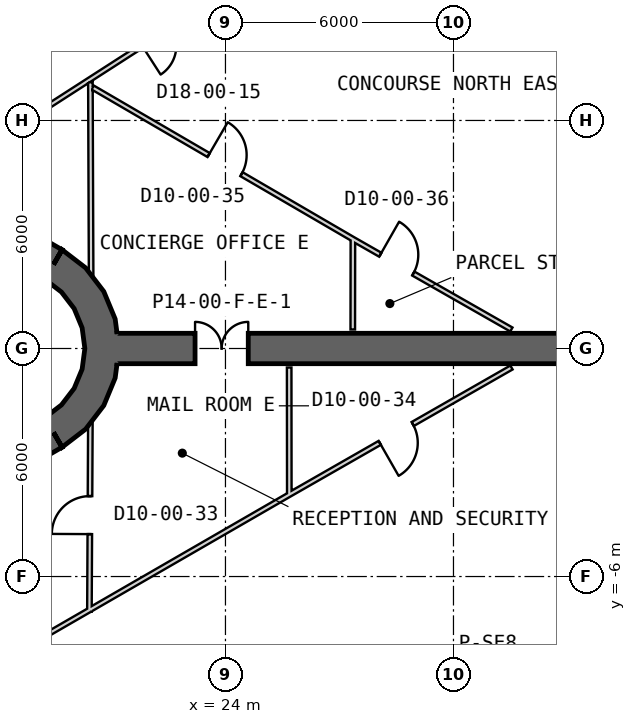
"""IFC4 building model, lengths in metres.
Left out: names, types, materials, properties, quantities, classifications, styles, units other than length and angle.
Written with IfcOpenShell. Run it as: python <this file> out.ifc"""

import sys

from ifc_helpers import new_model, si_unit, direction, frame, frame_2d, origin, place, context, subcontext, project, spatial, polyline, rectangle, outline, extrude, element, fill, save


model = new_model("IFC4")
c1 = context("Model", 3, precision=1e-05, world=origin(), true_north=direction((0.0, 1.0)))
c2 = subcontext(c1, "Body", "Model", "MODEL_VIEW")
j1 = project(units=[si_unit("LENGTHUNIT", "METRE"), si_unit("PLANEANGLEUNIT", "RADIAN")], contexts=[c1])
p1 = place(None, origin())
s1 = spatial("IfcSite", under=j1, at=p1, CompositionType="ELEMENT")
p2 = place(p1, origin())
s2 = spatial("IfcBuilding", under=s1, at=p2, CompositionType="ELEMENT")
p3 = place(p2, origin())
s3 = spatial("IfcBuildingStorey", under=s2, at=p3, CompositionType="ELEMENT", Elevation=0.0)
p4 = place(p3, frame((19.475, 2.208, 0.0), z_axis=(0.0, 0.0, 1.0), x_axis=(-0.866028369851, 0.499994862586, 0.0)))
e1 = element("IfcWall", 1, at=p4, inside=s3, PredefinedType="SHEAR", context=c2, shape_type="SweptSolid", body=[
    extrude(rectangle(XDim=31.523, YDim=0.9, at=frame_2d((15.762, 0.0))), origin(), (0.0, 0.0, 1.0), 9.0),
])
p5 = place(p4, frame((7.062, 0.0, 0.0)))
e2 = element("IfcOpeningElement", 2, at=p5, cuts=e1, PredefinedType="OPENING", context=c2, shape_type="SweptSolid", body=[
    extrude(rectangle(XDim=1.2, YDim=2.4, at=frame_2d((0.6, 1.2))), frame((0.0, 0.46, 0.0), z_axis=(0.0, -1.0, 0.0), x_axis=(1.0, 0.0, 0.0)), (0.0, 0.0, 1.0), 0.92),
])
p6 = place(p4, frame((9.762, 0.0, 0.0)))
e3 = element("IfcOpeningElement", 3, at=p6, cuts=e1, PredefinedType="OPENING", context=c2, shape_type="SweptSolid", body=[
    extrude(rectangle(XDim=1.2, YDim=2.4, at=frame_2d((0.6, 1.2))), frame((0.0, 0.46, 0.0), z_axis=(0.0, -1.0, 0.0), x_axis=(1.0, 0.0, 0.0)), (0.0, 0.0, 1.0), 0.92),
])
p7 = place(p4, frame((12.462, 0.0, 0.0)))
e4 = element("IfcOpeningElement", 4, at=p7, cuts=e1, PredefinedType="OPENING", context=c2, shape_type="SweptSolid", body=[
    extrude(rectangle(XDim=1.2, YDim=2.4, at=frame_2d((0.6, 1.2))), frame((0.0, 0.46, 0.0), z_axis=(0.0, -1.0, 0.0), x_axis=(1.0, 0.0, 0.0)), (0.0, 0.0, 1.0), 0.92),
])
p8 = place(p4, frame((15.162, 0.0, 0.0)))
e5 = element("IfcOpeningElement", 5, at=p8, cuts=e1, PredefinedType="OPENING", context=c2, shape_type="SweptSolid", body=[
    extrude(rectangle(XDim=1.2, YDim=2.4, at=frame_2d((0.6, 1.2))), frame((0.0, 0.46, 0.0), z_axis=(0.0, -1.0, 0.0), x_axis=(1.0, 0.0, 0.0)), (0.0, 0.0, 1.0), 0.92),
])
p9 = place(p4, frame((17.862, 0.0, 0.0)))
e6 = element("IfcOpeningElement", 6, at=p9, cuts=e1, PredefinedType="OPENING", context=c2, shape_type="SweptSolid", body=[
    extrude(rectangle(XDim=1.2, YDim=2.4, at=frame_2d((0.6, 1.2))), frame((0.0, 0.46, 0.0), z_axis=(0.0, -1.0, 0.0), x_axis=(1.0, 0.0, 0.0)), (0.0, 0.0, 1.0), 0.92),
])
p10 = place(p4, frame((20.562, 0.0, 0.0)))
e7 = element("IfcOpeningElement", 7, at=p10, cuts=e1, PredefinedType="OPENING", context=c2, shape_type="SweptSolid", body=[
    extrude(rectangle(XDim=1.2, YDim=2.4, at=frame_2d((0.6, 1.2))), frame((0.0, 0.46, 0.0), z_axis=(0.0, -1.0, 0.0), x_axis=(1.0, 0.0, 0.0)), (0.0, 0.0, 1.0), 0.92),
])
p11 = place(p4, frame((23.262, 0.0, 0.0)))
e8 = element("IfcOpeningElement", 8, at=p11, cuts=e1, PredefinedType="OPENING", context=c2, shape_type="SweptSolid", body=[
    extrude(rectangle(XDim=1.2, YDim=2.4, at=frame_2d((0.6, 1.2))), frame((0.0, 0.46, 0.0), z_axis=(0.0, -1.0, 0.0), x_axis=(1.0, 0.0, 0.0)), (0.0, 0.0, 1.0), 0.92),
])
p12 = place(p4, frame((3.612, 0.0, 0.0)))
e9 = element("IfcOpeningElement", 9, at=p12, cuts=e1, PredefinedType="OPENING", context=c2, shape_type="SweptSolid", body=[
    extrude(rectangle(XDim=1.2, YDim=2.4, at=frame_2d((0.6, 1.2))), frame((0.0, 0.46, 0.0), z_axis=(0.0, -1.0, 0.0), x_axis=(1.0, 0.0, 0.0)), (0.0, 0.0, 1.0), 0.92),
])
p13 = place(p4, frame((26.712, 0.0, 0.0)))
e10 = element("IfcOpeningElement", 10, at=p13, cuts=e1, PredefinedType="OPENING", context=c2, shape_type="SweptSolid", body=[
    extrude(rectangle(XDim=1.2, YDim=2.4, at=frame_2d((0.6, 1.2))), frame((0.0, 0.46, 0.0), z_axis=(0.0, -1.0, 0.0), x_axis=(1.0, 0.0, 0.0)), (0.0, 0.0, 1.0), 0.92),
])
p14 = place(p3, frame((-7.825, -17.97, 0.0), z_axis=(0.0, 0.0, 1.0), x_axis=(0.866028369851, 0.499994862586, 0.0)))
e11 = element("IfcWall", 11, at=p14, inside=s3, PredefinedType="SHEAR", context=c2, shape_type="SweptSolid", body=[
    extrude(rectangle(XDim=31.523, YDim=0.9, at=frame_2d((15.762, 0.0))), origin(), (0.0, 0.0, 1.0), 9.0),
])
p15 = place(p14, frame((7.062, 0.0, 0.0)))
e12 = element("IfcOpeningElement", 12, at=p15, cuts=e11, PredefinedType="OPENING", context=c2, shape_type="SweptSolid", body=[
    extrude(rectangle(XDim=1.2, YDim=2.4, at=frame_2d((0.6, 1.2))), frame((0.0, 0.46, 0.0), z_axis=(0.0, -1.0, 0.0), x_axis=(1.0, 0.0, 0.0)), (0.0, 0.0, 1.0), 0.92),
])
p16 = place(p14, frame((9.762, 0.0, 0.0)))
e13 = element("IfcOpeningElement", 13, at=p16, cuts=e11, PredefinedType="OPENING", context=c2, shape_type="SweptSolid", body=[
    extrude(rectangle(XDim=1.2, YDim=2.4, at=frame_2d((0.6, 1.2))), frame((0.0, 0.46, 0.0), z_axis=(0.0, -1.0, 0.0), x_axis=(1.0, 0.0, 0.0)), (0.0, 0.0, 1.0), 0.92),
])
p17 = place(p14, frame((12.462, 0.0, 0.0)))
e14 = element("IfcOpeningElement", 14, at=p17, cuts=e11, PredefinedType="OPENING", context=c2, shape_type="SweptSolid", body=[
    extrude(rectangle(XDim=1.2, YDim=2.4, at=frame_2d((0.6, 1.2))), frame((0.0, 0.46, 0.0), z_axis=(0.0, -1.0, 0.0), x_axis=(1.0, 0.0, 0.0)), (0.0, 0.0, 1.0), 0.92),
])
p18 = place(p14, frame((15.162, 0.0, 0.0)))
e15 = element("IfcOpeningElement", 15, at=p18, cuts=e11, PredefinedType="OPENING", context=c2, shape_type="SweptSolid", body=[
    extrude(rectangle(XDim=1.2, YDim=2.4, at=frame_2d((0.6, 1.2))), frame((0.0, 0.46, 0.0), z_axis=(0.0, -1.0, 0.0), x_axis=(1.0, 0.0, 0.0)), (0.0, 0.0, 1.0), 0.92),
])
p19 = place(p14, frame((17.862, 0.0, 0.0)))
e16 = element("IfcOpeningElement", 16, at=p19, cuts=e11, PredefinedType="OPENING", context=c2, shape_type="SweptSolid", body=[
    extrude(rectangle(XDim=1.2, YDim=2.4, at=frame_2d((0.6, 1.2))), frame((0.0, 0.46, 0.0), z_axis=(0.0, -1.0, 0.0), x_axis=(1.0, 0.0, 0.0)), (0.0, 0.0, 1.0), 0.92),
])
p20 = place(p14, frame((20.562, 0.0, 0.0)))
e17 = element("IfcOpeningElement", 17, at=p20, cuts=e11, PredefinedType="OPENING", context=c2, shape_type="SweptSolid", body=[
    extrude(rectangle(XDim=1.2, YDim=2.4, at=frame_2d((0.6, 1.2))), frame((0.0, 0.46, 0.0), z_axis=(0.0, -1.0, 0.0), x_axis=(1.0, 0.0, 0.0)), (0.0, 0.0, 1.0), 0.92),
])
p21 = place(p14, frame((26.712, 0.0, 0.0)))
e18 = element("IfcOpeningElement", 18, at=p21, cuts=e11, PredefinedType="OPENING", context=c2, shape_type="SweptSolid", body=[
    extrude(rectangle(XDim=1.2, YDim=2.4, at=frame_2d((0.6, 1.2))), frame((0.0, 0.46, 0.0), z_axis=(0.0, -1.0, 0.0), x_axis=(1.0, 0.0, 0.0)), (0.0, 0.0, 1.0), 0.92),
])
p22 = place(p14, frame((3.612, 0.0, 0.0)))
e19 = element("IfcOpeningElement", 19, at=p22, cuts=e11, PredefinedType="OPENING", context=c2, shape_type="SweptSolid", body=[
    extrude(rectangle(XDim=1.2, YDim=2.4, at=frame_2d((0.6, 1.2))), frame((0.0, 0.46, 0.0), z_axis=(0.0, -1.0, 0.0), x_axis=(1.0, 0.0, 0.0)), (0.0, 0.0, 1.0), 0.92),
])
p23 = place(p3, origin())
e20 = element("IfcWall", 20, at=p23, inside=s3, PredefinedType="SHEAR", context=c2, shape_type="SweptSolid", body=[
    extrude(outline(polyline([(19.7, -2.598), (20.321, -2.121), (20.798, -1.5), (21.098, -0.777), (21.2, 0.0), (21.098, 0.777), (20.798, 1.5), (20.321, 2.121), (19.7, 2.598), (19.25, 1.819), (19.685, 1.485), (20.019, 1.05), (20.229, 0.543), (20.3, 0.0), (20.229, -0.543), (20.019, -1.05), (19.685, -1.485), (19.25, -1.819), (19.7, -2.598)])), origin(), (0.0, 0.0, 1.0), 9.0),
])
p24 = place(p3, frame((21.15, 0.0, 0.0), z_axis=(0.0, 0.0, 1.0), x_axis=(1.0, 0.0, 0.0)))
e21 = element("IfcWall", 21, at=p24, inside=s3, PredefinedType="SHEAR", context=c2, shape_type="SweptSolid", body=[
    extrude(rectangle(XDim=13.954, YDim=0.8, at=frame_2d((6.977, 0.0))), origin(), (0.0, 0.0, 1.0), 9.0),
])
p25 = place(p24, frame((2.05, 0.0, 0.0)))
e22 = element("IfcOpeningElement", 22, at=p25, cuts=e21, PredefinedType="OPENING", context=c2, shape_type="SweptSolid", body=[
    extrude(rectangle(XDim=1.4, YDim=2.4, at=frame_2d((0.7, 1.2))), frame((0.0, 0.41, 0.0), z_axis=(0.0, -1.0, 0.0), x_axis=(1.0, 0.0, 0.0)), (0.0, 0.0, 1.0), 0.82),
])
p26 = place(p3, frame((20.42, -6.917, 0.0), z_axis=(0.0, 0.0, 1.0), x_axis=(0.005057124102, 0.999987212666, 0.0)))
e23 = element("IfcWall", 23, at=p26, inside=s3, PredefinedType="PARTITIONING", context=c2, shape_type="SweptSolid", body=[
    extrude(rectangle(XDim=5.166, YDim=0.12, at=frame_2d((2.583, 0.0))), origin(), (0.0, 0.0, 1.0), 7.67),
])
p27 = place(p26, frame((2.032, 0.0, 0.0)))
e24 = element("IfcOpeningElement", 24, at=p27, cuts=e23, PredefinedType="OPENING", context=c2, shape_type="SweptSolid", body=[
    extrude(rectangle(XDim=1.0, YDim=2.1, at=frame_2d((0.5, 1.05))), frame((0.0, 0.07, 0.0), z_axis=(0.0, -1.0, 0.0), x_axis=(1.0, 0.0, 0.0)), (0.0, 0.0, 1.0), 0.14),
])
p28 = place(p3, frame((-4.276, -21.14, 0.0), z_axis=(0.0, 0.0, 1.0), x_axis=(0.866026219638, 0.499998586897, 0.0)))
e25 = element("IfcWall", 25, at=p28, inside=s3, PredefinedType="PARTITIONING", context=c2, shape_type="SweptSolid", body=[
    extrude(rectangle(XDim=28.547, YDim=0.12, at=frame_2d((14.273, 0.0))), origin(), (0.0, 0.0, 1.0), 8.7),
])
p29 = place(p28, frame((20.947, 0.0, 0.0)))
e26 = element("IfcOpeningElement", 26, at=p29, cuts=e25, PredefinedType="OPENING", context=c2, shape_type="SweptSolid", body=[
    extrude(rectangle(XDim=1.8, YDim=2.1, at=frame_2d((0.9, 1.05))), frame((0.0, 0.07, 0.0), z_axis=(0.0, -1.0, 0.0), x_axis=(1.0, 0.0, 0.0)), (0.0, 0.0, 1.0), 0.14),
])
p30 = place(p28, frame((13.347, 0.0, 0.0)))
e27 = element("IfcOpeningElement", 27, at=p30, cuts=e25, PredefinedType="OPENING", context=c2, shape_type="SweptSolid", body=[
    extrude(rectangle(XDim=1.8, YDim=2.1, at=frame_2d((0.9, 1.05))), frame((0.0, 0.07, 0.0), z_axis=(0.0, -1.0, 0.0), x_axis=(1.0, 0.0, 0.0)), (0.0, 0.0, 1.0), 0.14),
])
p31 = place(p28, frame((5.747, 0.0, 0.0)))
e28 = element("IfcOpeningElement", 28, at=p31, cuts=e25, PredefinedType="OPENING", context=c2, shape_type="SweptSolid", body=[
    extrude(rectangle(XDim=1.8, YDim=2.1, at=frame_2d((0.9, 1.05))), frame((0.0, 0.07, 0.0), z_axis=(0.0, -1.0, 0.0), x_axis=(1.0, 0.0, 0.0)), (0.0, 0.0, 1.0), 0.14),
])
p32 = place(p3, frame((25.68, -3.88, 0.0), z_axis=(0.0, 0.0, 1.0), x_axis=(-0.001011267902, 0.999999488668, 0.0)))
e29 = element("IfcWall", 29, at=p32, inside=s3, PredefinedType="PARTITIONING", context=c2, shape_type="SweptSolid", body=[
    extrude(rectangle(XDim=3.38, YDim=0.12, at=frame_2d((1.69, 0.0))), origin(), (0.0, 0.0, 1.0), 7.78),
])
p33 = place(p3, frame((25.706, -3.83, 0.0), z_axis=(0.0, 0.0, 1.0), x_axis=(-0.866022911947, -0.500004315964, 0.0)))
e30 = element("IfcWall", 30, at=p33, inside=s3, PredefinedType="PARTITIONING", context=c2, shape_type="SweptSolid", body=[
    extrude(rectangle(XDim=6.073, YDim=0.12, at=frame_2d((3.037, 0.0))), origin(), (0.0, 0.0, 1.0), 7.78),
])
p34 = place(p3, frame((31.526, -0.5, 0.0), z_axis=(0.0, 0.0, 1.0), x_axis=(-0.867958459522, -0.49663680144, 0.0)))
e31 = element("IfcWall", 31, at=p34, inside=s3, PredefinedType="PARTITIONING", context=c2, shape_type="SweptSolid", body=[
    extrude(rectangle(XDim=6.706, YDim=0.12, at=frame_2d((3.353, 0.0))), origin(), (0.0, 0.0, 1.0), 7.78),
])
p35 = place(p34, frame((2.993, 0.0, 0.0)))
e32 = element("IfcOpeningElement", 32, at=p35, cuts=e31, PredefinedType="OPENING", context=c2, shape_type="SweptSolid", body=[
    extrude(rectangle(XDim=1.0, YDim=2.1, at=frame_2d((0.5, 1.05))), frame((0.0, 0.07, 0.0), z_axis=(0.0, -1.0, 0.0), x_axis=(1.0, 0.0, 0.0)), (0.0, 0.0, 1.0), 0.14),
])
p36 = place(p3, frame((27.35, 0.5, 0.0), z_axis=(0.0, 0.0, 1.0), x_axis=(0.001416142622, 0.99999899727, 0.0)))
e33 = element("IfcWall", 33, at=p36, inside=s3, PredefinedType="PARTITIONING", context=c2, shape_type="SweptSolid", body=[
    extrude(rectangle(XDim=2.414, YDim=0.12, at=frame_2d((1.207, 0.0))), origin(), (0.0, 0.0, 1.0), 8.7),
])
p37 = place(p3, frame((20.446, 7.006, 0.0), z_axis=(0.0, 0.0, 1.0), x_axis=(0.003746504696, -0.999992981827, 0.0)))
e34 = element("IfcWall", 34, at=p37, inside=s3, PredefinedType="PARTITIONING", context=c2, shape_type="SweptSolid", body=[
    extrude(rectangle(XDim=5.278, YDim=0.12, at=frame_2d((2.639, 0.0))), origin(), (0.0, 0.0, 1.0), 7.78),
])
p38 = place(p3, frame((20.506, 6.866, 0.0), z_axis=(0.0, 0.0, 1.0), x_axis=(0.864152740078, -0.503229611425, 0.0)))
e35 = element("IfcWall", 35, at=p38, inside=s3, PredefinedType="PARTITIONING", context=c2, shape_type="SweptSolid", body=[
    extrude(rectangle(XDim=7.954, YDim=0.12, at=frame_2d((3.977, 0.0))), origin(), (0.0, 0.0, 1.0), 7.78),
])
p39 = place(p38, frame((3.531, 0.0, 0.0)))
e36 = element("IfcOpeningElement", 36, at=p39, cuts=e35, PredefinedType="OPENING", context=c2, shape_type="SweptSolid", body=[
    extrude(rectangle(XDim=1.0, YDim=2.1, at=frame_2d((0.5, 1.05))), frame((0.0, 0.07, 0.0), z_axis=(0.0, -1.0, 0.0), x_axis=(1.0, 0.0, 0.0)), (0.0, 0.0, 1.0), 0.14),
])
p40 = place(p3, frame((27.379, 2.864, 0.0), z_axis=(0.0, 0.0, 1.0), x_axis=(0.868605055941, -0.495505052238, 0.0)))
e37 = element("IfcWall", 37, at=p40, inside=s3, PredefinedType="PARTITIONING", context=c2, shape_type="SweptSolid", body=[
    extrude(rectangle(XDim=4.771, YDim=0.12, at=frame_2d((2.385, 0.0))), origin(), (0.0, 0.0, 1.0), 8.7),
])
p41 = place(p40, frame((0.8, 0.0, 0.0)))
e38 = element("IfcOpeningElement", 38, at=p41, cuts=e37, PredefinedType="OPENING", context=c2, shape_type="SweptSolid", body=[
    extrude(rectangle(XDim=1.0, YDim=2.1, at=frame_2d((0.5, 1.05))), frame((0.0, 0.07, 0.0), z_axis=(0.0, -1.0, 0.0), x_axis=(1.0, 0.0, 0.0)), (0.0, 0.0, 1.0), 0.14),
])
p42 = place(p3, frame((17.286, 5.053, 0.0), z_axis=(0.0, 0.0, 1.0), x_axis=(0.840791306929, 0.541359379888, 0.0)))
e39 = element("IfcWall", 39, at=p42, inside=s3, PredefinedType="PARTITIONING", context=c2, shape_type="SweptSolid", body=[
    extrude(rectangle(XDim=12.546, YDim=0.12, at=frame_2d((6.273, 0.0))), origin(), (0.0, 0.0, 1.0), 7.88),
])
p43 = place(p42, frame((5.377, 0.0, 0.0)))
e40 = element("IfcOpeningElement", 40, at=p43, cuts=e39, PredefinedType="OPENING", context=c2, shape_type="SweptSolid", body=[
    extrude(rectangle(XDim=1.8, YDim=2.1, at=frame_2d((0.9, 1.05))), frame((0.0, 0.07, 0.0), z_axis=(0.0, -1.0, 0.0), x_axis=(1.0, 0.0, 0.0)), (0.0, 0.0, 1.0), 0.14),
])
p44 = place(p27, origin())
e41 = element("IfcDoor", 41, at=p44, inside=s3, OperationType="SINGLE_SWING_LEFT", PredefinedType="NOTDEFINED", context=c2, shape_type="SweptSolid", body=[
    extrude(rectangle(XDim=1.0, YDim=2.1, at=frame_2d((0.5, 1.05))), frame((0.0, 0.025, 0.0), z_axis=(0.0, -1.0, 0.0), x_axis=(1.0, 0.0, 0.0)), (0.0, 0.0, 1.0), 0.05),
])
fill(e24, e41)
p45 = place(p35, origin())
e42 = element("IfcDoor", 42, at=p45, inside=s3, OperationType="SINGLE_SWING_RIGHT", PredefinedType="NOTDEFINED", context=c2, shape_type="SweptSolid", body=[
    extrude(rectangle(XDim=1.0, YDim=2.1, at=frame_2d((0.5, 1.05))), frame((0.0, 0.025, 0.0), z_axis=(0.0, -1.0, 0.0), x_axis=(1.0, 0.0, 0.0)), (0.0, 0.0, 1.0), 0.05),
])
fill(e32, e42)
p46 = place(p39, origin())
e43 = element("IfcDoor", 43, at=p46, inside=s3, OperationType="SINGLE_SWING_LEFT", PredefinedType="NOTDEFINED", context=c2, shape_type="SweptSolid", body=[
    extrude(rectangle(XDim=1.0, YDim=2.1, at=frame_2d((0.5, 1.05))), frame((0.0, 0.025, 0.0), z_axis=(0.0, -1.0, 0.0), x_axis=(1.0, 0.0, 0.0)), (0.0, 0.0, 1.0), 0.05),
])
fill(e36, e43)
p47 = place(p41, origin())
e44 = element("IfcDoor", 44, at=p47, inside=s3, OperationType="SINGLE_SWING_LEFT", PredefinedType="NOTDEFINED", context=c2, shape_type="SweptSolid", body=[
    extrude(rectangle(XDim=1.0, YDim=2.1, at=frame_2d((0.5, 1.05))), frame((0.0, 0.025, 0.0), z_axis=(0.0, -1.0, 0.0), x_axis=(1.0, 0.0, 0.0)), (0.0, 0.0, 1.0), 0.05),
])
fill(e38, e44)
p48 = place(p25, origin())
e45 = element("IfcDoor", 45, at=p48, inside=s3, OperationType="DOUBLE_DOOR_SINGLE_SWING", PredefinedType="NOTDEFINED", context=c2, shape_type="SweptSolid", body=[
    extrude(rectangle(XDim=1.4, YDim=2.4, at=frame_2d((0.7, 1.2))), frame((0.0, 0.025, 0.0), z_axis=(0.0, -1.0, 0.0), x_axis=(1.0, 0.0, 0.0)), (0.0, 0.0, 1.0), 0.05),
])
fill(e22, e45)
save(model, sys.argv[1])
